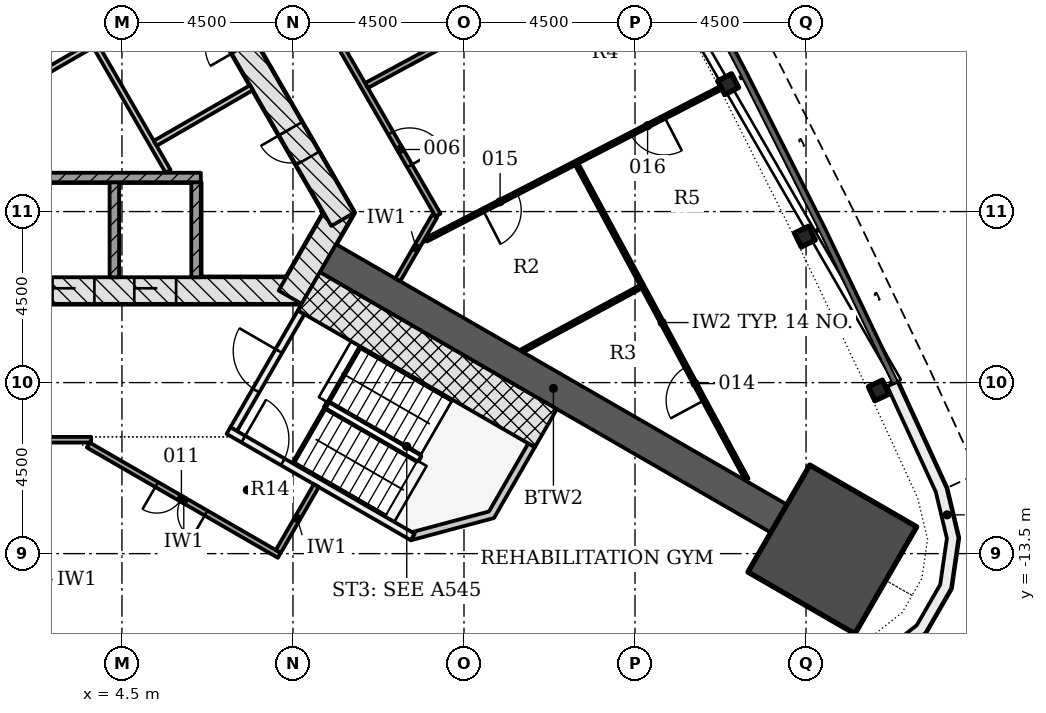
"""IFC4 building model, lengths in metres.
Left out: names, types, materials, properties, quantities, classifications, styles, units other than length and angle.
Written with IfcOpenShell. Run it as: python <this file> out.ifc"""

import sys

from ifc_helpers import new_model, si_unit, direction, frame, frame_2d, origin, origin_2d, place, context, subcontext, project, spatial, polyline, rectangle, i_section, outline, extrude, element, fill, save


model = new_model("IFC4")
c1 = context("Model", 3, precision=1e-05, world=origin(), true_north=direction((0.0, 1.0)))
c2 = subcontext(c1, "Body", "Model", "MODEL_VIEW")
j1 = project(units=[si_unit("LENGTHUNIT", "METRE"), si_unit("PLANEANGLEUNIT", "RADIAN")], contexts=[c1])
p1 = place(None, origin())
s1 = spatial("IfcSite", under=j1, at=p1, CompositionType="ELEMENT")
p2 = place(p1, origin())
s2 = spatial("IfcBuilding", under=s1, at=p2, CompositionType="ELEMENT")
p3 = place(p2, frame((0.0, 0.0, 58.2)))
s3 = spatial("IfcBuildingStorey", under=s2, at=p3, CompositionType="ELEMENT", Elevation=58.2)
p4 = place(p3, frame((-9.229, -6.578, -0.2), z_axis=(0.0, 0.0, 1.0), x_axis=(1.0, 0.0, 0.0)))
e1 = element("IfcWall", 1, at=p4, inside=s3, PredefinedType="SHEAR", context=c2, shape_type="SweptSolid", body=[
    extrude(rectangle(XDim=18.458, YDim=0.7, at=frame_2d((9.229, 0.0))), origin(), (0.0, 0.0, 1.0), 3.6),
])
p5 = place(p4, frame((3.304, 0.0, 0.2)))
e2 = element("IfcOpeningElement", 2, at=p5, cuts=e1, PredefinedType="OPENING", context=c2, shape_type="SweptSolid", body=[
    extrude(rectangle(XDim=1.1, YDim=2.1, at=frame_2d((0.55, 1.05))), frame((0.0, 0.36, 0.0), z_axis=(0.0, -1.0, 0.0), x_axis=(1.0, 0.0, 0.0)), (0.0, 0.0, 1.0), 0.72),
])
p6 = place(p4, frame((5.454, 0.0, 0.2)))
e3 = element("IfcOpeningElement", 3, at=p6, cuts=e1, PredefinedType="OPENING", context=c2, shape_type="SweptSolid", body=[
    extrude(rectangle(XDim=1.1, YDim=2.1, at=frame_2d((0.55, 1.05))), frame((0.0, 0.36, 0.0), z_axis=(0.0, -1.0, 0.0), x_axis=(1.0, 0.0, 0.0)), (0.0, 0.0, 1.0), 0.72),
])
p7 = place(p4, frame((7.604, 0.0, 0.2)))
e4 = element("IfcOpeningElement", 4, at=p7, cuts=e1, PredefinedType="OPENING", context=c2, shape_type="SweptSolid", body=[
    extrude(rectangle(XDim=1.1, YDim=2.1, at=frame_2d((0.55, 1.05))), frame((0.0, 0.36, 0.0), z_axis=(0.0, -1.0, 0.0), x_axis=(1.0, 0.0, 0.0)), (0.0, 0.0, 1.0), 0.72),
])
p8 = place(p4, frame((9.754, 0.0, 0.2)))
e5 = element("IfcOpeningElement", 5, at=p8, cuts=e1, PredefinedType="OPENING", context=c2, shape_type="SweptSolid", body=[
    extrude(rectangle(XDim=1.1, YDim=2.1, at=frame_2d((0.55, 1.05))), frame((0.0, 0.36, 0.0), z_axis=(0.0, -1.0, 0.0), x_axis=(1.0, 0.0, 0.0)), (0.0, 0.0, 1.0), 0.72),
])
p9 = place(p4, frame((11.904, 0.0, 0.2)))
e6 = element("IfcOpeningElement", 6, at=p9, cuts=e1, PredefinedType="OPENING", context=c2, shape_type="SweptSolid", body=[
    extrude(rectangle(XDim=1.1, YDim=2.1, at=frame_2d((0.55, 1.05))), frame((0.0, 0.36, 0.0), z_axis=(0.0, -1.0, 0.0), x_axis=(1.0, 0.0, 0.0)), (0.0, 0.0, 1.0), 0.72),
])
p10 = place(p4, frame((14.054, 0.0, 0.2)))
e7 = element("IfcOpeningElement", 7, at=p10, cuts=e1, PredefinedType="OPENING", context=c2, shape_type="SweptSolid", body=[
    extrude(rectangle(XDim=1.1, YDim=2.1, at=frame_2d((0.55, 1.05))), frame((0.0, 0.36, 0.0), z_axis=(0.0, -1.0, 0.0), x_axis=(1.0, 0.0, 0.0)), (0.0, 0.0, 1.0), 0.72),
])
p11 = place(p4, frame((0.926, 0.0, 0.2)))
e8 = element("IfcOpeningElement", 8, at=p11, cuts=e1, PredefinedType="OPENING", context=c2, shape_type="SweptSolid", body=[
    extrude(rectangle(XDim=0.9, YDim=2.1, at=frame_2d((0.45, 1.05))), frame((0.0, 0.36, 0.0), z_axis=(0.0, -1.0, 0.0), x_axis=(1.0, 0.0, 0.0)), (0.0, 0.0, 1.0), 0.72),
])
p12 = place(p3, frame((8.926, -6.753, -0.2), z_axis=(0.0, 0.0, 1.0), x_axis=(0.500042739161, 0.866000726912, 0.0)))
e9 = element("IfcWall", 9, at=p12, inside=s3, PredefinedType="SHEAR", context=c2, shape_type="SweptSolid", body=[
    extrude(rectangle(XDim=2.771, YDim=0.7, at=frame_2d((1.386, 0.0))), origin(), (0.0, 0.0, 1.0), 3.6),
])
p13 = place(p3, frame((10.311, -4.703, -0.2), z_axis=(0.0, 0.0, 1.0), x_axis=(-0.500001446645, 0.866024568562, 0.0)))
e10 = element("IfcWall", 10, at=p13, inside=s3, PredefinedType="SHEAR", context=c2, shape_type="SweptSolid", body=[
    extrude(rectangle(XDim=18.458, YDim=0.7, at=frame_2d((9.229, 0.0))), origin(), (0.0, 0.0, 1.0), 3.6),
])
p14 = place(p13, frame((7.5, 0.0, 0.2)))
e11 = element("IfcOpeningElement", 11, at=p14, cuts=e10, PredefinedType="OPENING", context=c2, shape_type="SweptSolid", body=[
    extrude(rectangle(XDim=1.0, YDim=2.1, at=frame_2d((0.5, 1.05))), frame((0.0, 0.36, 0.0), z_axis=(0.0, -1.0, 0.0), x_axis=(1.0, 0.0, 0.0)), (0.0, 0.0, 1.0), 0.72),
])
p15 = place(p13, frame((1.852, 0.0, 0.2)))
e12 = element("IfcOpeningElement", 12, at=p15, cuts=e10, PredefinedType="OPENING", context=c2, shape_type="SweptSolid", body=[
    extrude(rectangle(XDim=0.9, YDim=2.1, at=frame_2d((0.45, 1.05))), frame((0.0, 0.36, 0.0), z_axis=(0.0, -1.0, 0.0), x_axis=(1.0, 0.0, 0.0)), (0.0, 0.0, 1.0), 0.72),
])
p16 = place(p13, frame((5.238, 0.0, 0.2)))
e13 = element("IfcOpeningElement", 13, at=p16, cuts=e10, PredefinedType="OPENING", context=c2, shape_type="SweptSolid", body=[
    extrude(rectangle(XDim=1.0, YDim=2.1, at=frame_2d((0.5, 1.05))), frame((0.0, 0.36, 0.0), z_axis=(0.0, -1.0, 0.0), x_axis=(1.0, 0.0, 0.0)), (0.0, 0.0, 1.0), 0.72),
])
p17 = place(p13, frame((13.63, 0.0, 0.2)))
e14 = element("IfcOpeningElement", 14, at=p17, cuts=e10, PredefinedType="OPENING", context=c2, shape_type="SweptSolid", body=[
    extrude(rectangle(XDim=0.9, YDim=2.1, at=frame_2d((0.45, 1.05))), frame((0.0, 0.36, 0.0), z_axis=(0.0, -1.0, 0.0), x_axis=(1.0, 0.0, 0.0)), (0.0, 0.0, 1.0), 0.72),
])
p18 = place(p3, frame((9.922, -5.728, -0.2), z_axis=(0.0, 0.0, 1.0), x_axis=(0.866030067197, -0.499991922645, 0.0)))
e15 = element("IfcWall", 15, at=p18, inside=s3, PredefinedType="SHEAR", context=c2, shape_type="SweptSolid", body=[
    extrude(rectangle(XDim=13.698, YDim=0.85, at=frame_2d((6.849, 0.0))), origin(), (0.0, 0.0, 1.0), 3.6),
])
p19 = place(p3, frame((23.192, -13.39, -0.2), z_axis=(0.0, 0.0, 1.0), x_axis=(0.866025403784, -0.5, 0.0)))
e16 = element("IfcColumn", 16, at=p19, inside=s3, PredefinedType="COLUMN", context=c2, shape_type="SweptSolid", body=[
    extrude(rectangle(XDim=3.25, YDim=3.25, at=origin_2d()), origin(), (0.0, 0.0, 1.0), 3.6),
])
for number, where, z_axis, x_axis in (
    (17, (24.411, -9.206, -0.2), (0.0, 0.0, 1.0), (-0.424, 0.906, 0.0)),
    (18, (22.469, -5.158, -0.2), (0.0, 0.0, 1.0), (-0.441, 0.897, 0.0)),
    (19, (20.451, -1.148, -0.2), (0.0, 0.0, 1.0), (-0.458, 0.889, 0.0)),
):
    element("IfcColumn", number, at=place(p3, frame(where, z_axis=z_axis, x_axis=x_axis)), inside=s3, PredefinedType="COLUMN", context=c2, shape_type="SweptSolid", body=[
        extrude(i_section(OverallWidth=0.404, OverallDepth=0.406, WebThickness=0.027, FlangeThickness=0.044, FilletRadius=0.015, at=origin_2d()), origin(), (0.0, 0.0, 1.0), 3.6),
    ])
p20 = place(p3, origin())
e20 = element("IfcWall", 20, at=p20, inside=s3, PredefinedType="NOTDEFINED", context=c2, shape_type="SweptSolid", body=[
    extrude(outline(polyline([(20.225, -17.085), (23.297, -16.8), (24.588, -16.417), (25.645, -15.583), (26.318, -14.417), (26.511, -13.085), (26.198, -11.776), (24.909, -8.973), (24.636, -9.098), (25.913, -11.875), (26.206, -13.099), (26.029, -14.317), (25.414, -15.384), (24.447, -16.146), (23.24, -16.504), (20.197, -16.787), (20.225, -17.085)])), origin(), (0.0, 0.0, 1.0), 3.3),
])
for number, where, z_axis, x_axis in (
    (21, (4.3, -6.228, -0.2), (0.0, 0.0, 1.0), (0.0, 1.0, 0.0)),
    (22, (6.45, -6.228, -0.2), (0.0, 0.0, 1.0), (0.0, 1.0, 0.0)),
):
    element("IfcWall", number, at=place(p3, frame(where, z_axis=z_axis, x_axis=x_axis)), inside=s3, PredefinedType="PARTITIONING", context=c2, shape_type="SweptSolid", body=[
        extrude(rectangle(XDim=2.5, YDim=0.25, at=frame_2d((1.25, 0.0))), origin(), (0.0, 0.0, 1.0), 3.6),
    ])
p21 = place(p3, frame((-6.575, -3.603, 0.0), z_axis=(0.0, 0.0, 1.0), x_axis=(1.0, 0.0, 0.0)))
e23 = element("IfcWall", 23, at=p21, inside=s3, PredefinedType="PARTITIONING", context=c2, shape_type="SweptSolid", body=[
    extrude(rectangle(XDim=13.15, YDim=0.25, at=frame_2d((6.575, 0.0))), origin(), (0.0, 0.0, 1.0), 3.4),
])
p22 = place(p3, frame((-4.904, -3.413, 0.0), z_axis=(0.0, 0.0, 1.0), x_axis=(0.866020716117, 0.500008119189, 0.0)))
e24 = element("IfcWall", 24, at=p22, inside=s3, PredefinedType="PARTITIONING", context=c2, shape_type="SweptSolid", body=[
    extrude(rectangle(XDim=12.182, YDim=0.15, at=frame_2d((6.091, 0.0))), origin(), (0.0, 0.0, 1.0), 3.4),
])
p23 = place(p22, frame((4.142, 0.0, 0.0)))
e25 = element("IfcOpeningElement", 25, at=p23, cuts=e24, PredefinedType="OPENING", context=c2, shape_type="SweptSolid", body=[
    extrude(rectangle(XDim=0.9, YDim=2.1, at=frame_2d((0.45, 1.05))), frame((0.0, 0.085, 0.0), z_axis=(0.0, -1.0, 0.0), x_axis=(1.0, 0.0, 0.0)), (0.0, 0.0, 1.0), 0.17),
])
p24 = place(p3, frame((-2.004, -3.413, 0.0), z_axis=(0.0, 0.0, 1.0), x_axis=(0.866030034802, 0.499991978756, 0.0)))
e26 = element("IfcWall", 26, at=p24, inside=s3, PredefinedType="PARTITIONING", context=c2, shape_type="SweptSolid", body=[
    extrude(rectangle(XDim=9.671, YDim=0.15, at=frame_2d((4.835, 0.0))), origin(), (0.0, 0.0, 1.0), 3.4),
])
p25 = place(p24, frame((2.886, 0.0, 0.0)))
e27 = element("IfcOpeningElement", 27, at=p25, cuts=e26, PredefinedType="OPENING", context=c2, shape_type="SweptSolid", body=[
    extrude(rectangle(XDim=0.9, YDim=2.1, at=frame_2d((0.45, 1.05))), frame((0.0, 0.085, 0.0), z_axis=(0.0, -1.0, 0.0), x_axis=(1.0, 0.0, 0.0)), (0.0, 0.0, 1.0), 0.17),
])
p26 = place(p3, frame((5.713, -3.439, 0.0), z_axis=(0.0, 0.0, 1.0), x_axis=(-0.499981559197, 0.866036050325, 0.0)))
e28 = element("IfcWall", 28, at=p26, inside=s3, PredefinedType="PARTITIONING", context=c2, shape_type="SweptSolid", body=[
    extrude(rectangle(XDim=3.806, YDim=0.15, at=frame_2d((1.903, 0.0))), origin(), (0.0, 0.0, 1.0), 3.4),
])
p27 = place(p3, frame((5.375, -2.703, 0.0), z_axis=(0.0, 0.0, 1.0), x_axis=(0.866046596414, 0.499963291492, 0.0)))
e29 = element("IfcWall", 29, at=p27, inside=s3, PredefinedType="PARTITIONING", context=c2, shape_type="SweptSolid", body=[
    extrude(rectangle(XDim=2.925, YDim=0.15, at=frame_2d((1.462, 0.0))), origin(), (0.0, 0.0, 1.0), 3.4),
])
p28 = place(p3, frame((7.44, -10.226, -0.2), z_axis=(0.0, 0.0, 1.0), x_axis=(0.500022077904, 0.866012656725, 0.0)))
e30 = element("IfcWall", 30, at=p28, inside=s3, PredefinedType="SHEAR", context=c2, shape_type="SweptSolid", body=[
    extrude(rectangle(XDim=3.55, YDim=0.2, at=frame_2d((1.775, 0.0))), origin(), (0.0, 0.0, 1.0), 3.6),
])
p29 = place(p28, frame((1.175, 0.0, 0.2)))
e31 = element("IfcOpeningElement", 31, at=p29, cuts=e30, PredefinedType="OPENING", context=c2, shape_type="SweptSolid", body=[
    extrude(rectangle(XDim=1.2, YDim=2.1, at=frame_2d((0.6, 1.05))), frame((0.0, 0.11, 0.0), z_axis=(0.0, -1.0, 0.0), x_axis=(1.0, 0.0, 0.0)), (0.0, 0.0, 1.0), 0.22),
])
p30 = place(p3, frame((7.304, -10.262, -0.2), z_axis=(0.0, 0.0, 1.0), x_axis=(0.866026594901, -0.49999793692, 0.0)))
e32 = element("IfcWall", 32, at=p30, inside=s3, PredefinedType="SHEAR", context=c2, shape_type="SweptSolid", body=[
    extrude(rectangle(XDim=5.6, YDim=0.2, at=frame_2d((2.8, 0.0))), origin(), (0.0, 0.0, 1.0), 3.6),
])
p31 = place(p30, frame((0.45, 0.0, 0.2)))
e33 = element("IfcOpeningElement", 33, at=p31, cuts=e32, PredefinedType="OPENING", context=c2, shape_type="SweptSolid", body=[
    extrude(rectangle(XDim=1.2, YDim=2.1, at=frame_2d((0.6, 1.05))), frame((0.0, 0.11, 0.0), z_axis=(0.0, -1.0, 0.0), x_axis=(1.0, 0.0, 0.0)), (0.0, 0.0, 1.0), 0.22),
])
p32 = place(p3, frame((9.419, -6.599, -0.2), z_axis=(0.0, 0.0, 1.0), x_axis=(0.866033125095, -0.499986626058, 0.0)))
e34 = element("IfcWall", 34, at=p32, inside=s3, PredefinedType="SHEAR", context=c2, shape_type="SweptSolid", body=[
    extrude(rectangle(XDim=7.2, YDim=1.161, at=frame_2d((3.6, 0.0))), origin(), (0.0, 0.0, 1.0), 3.6),
])
p33 = place(p3, frame((0.0, 0.0, -0.2)))
e35 = element("IfcWall", 35, at=p33, inside=s3, PredefinedType="SHEAR", context=c2, shape_type="SweptSolid", body=[
    extrude(outline(polyline([(12.104, -13.149), (14.289, -12.563), (15.364, -10.701), (15.191, -10.601), (14.157, -12.392), (12.132, -12.934), (12.204, -12.976), (12.204, -12.976), (12.204, -12.976), (12.204, -12.976), (12.204, -12.976), (12.204, -12.976), (12.204, -12.976), (12.204, -12.976), (12.204, -12.976), (12.204, -12.976), (12.204, -12.976), (12.204, -12.976), (12.204, -12.976), (12.204, -12.976), (12.204, -12.976), (12.204, -12.976), (12.204, -12.976), (12.104, -13.149)])), origin(), (0.0, 0.0, 1.0), 3.6),
])
p34 = place(p3, frame((5.289, 8.446, 0.0), z_axis=(0.0, 0.0, 1.0), x_axis=(0.499996620721, -0.866027354803, 0.0)))
e36 = element("IfcWall", 36, at=p34, inside=s3, PredefinedType="PARTITIONING", context=c2, shape_type="SweptSolid", body=[
    extrude(rectangle(XDim=15.057, YDim=0.15, at=frame_2d((7.528, 0.0))), origin(), (0.0, 0.0, 1.0), 2.778),
])
p35 = place(p34, frame((12.563, 0.0, 0.0)))
e37 = element("IfcOpeningElement", 37, at=p35, cuts=e36, PredefinedType="OPENING", context=c2, shape_type="SweptSolid", body=[
    extrude(rectangle(XDim=1.0, YDim=2.1, at=frame_2d((0.5, 1.05))), frame((0.0, 0.085, 0.0), z_axis=(0.0, -1.0, 0.0), x_axis=(1.0, 0.0, 0.0)), (0.0, 0.0, 1.0), 0.17),
])
p36 = place(p34, frame((7.312, 0.0, 0.0)))
e38 = element("IfcOpeningElement", 38, at=p36, cuts=e36, PredefinedType="OPENING", context=c2, shape_type="SweptSolid", body=[
    extrude(rectangle(XDim=1.0, YDim=2.1, at=frame_2d((0.5, 1.05))), frame((0.0, 0.085, 0.0), z_axis=(0.0, -1.0, 0.0), x_axis=(1.0, 0.0, 0.0)), (0.0, 0.0, 1.0), 0.17),
])
p37 = place(p34, frame((5.356, 0.0, 0.0)))
e39 = element("IfcOpeningElement", 39, at=p37, cuts=e36, PredefinedType="OPENING", context=c2, shape_type="SweptSolid", body=[
    extrude(rectangle(XDim=1.0, YDim=2.1, at=frame_2d((0.5, 1.05))), frame((0.0, 0.085, 0.0), z_axis=(0.0, -1.0, 0.0), x_axis=(1.0, 0.0, 0.0)), (0.0, 0.0, 1.0), 0.17),
])
p38 = place(p3, frame((3.689, -10.503, 0.0), z_axis=(0.0, 0.0, 1.0), x_axis=(-1.0, 0.0, 0.0)))
e40 = element("IfcWall", 40, at=p38, inside=s3, PredefinedType="PARTITIONING", context=c2, shape_type="SweptSolid", body=[
    extrude(rectangle(XDim=13.068, YDim=0.15, at=frame_2d((6.534, 0.0))), origin(), (0.0, 0.0, 1.0), 2.778),
])
p39 = place(p38, frame((10.852, 0.0, 0.0)))
e41 = element("IfcOpeningElement", 41, at=p39, cuts=e40, PredefinedType="OPENING", context=c2, shape_type="SweptSolid", body=[
    extrude(rectangle(XDim=1.5, YDim=2.1, at=frame_2d((0.75, 1.05))), frame((0.0, 0.085, 0.0), z_axis=(0.0, -1.0, 0.0), x_axis=(1.0, 0.0, 0.0)), (0.0, 0.0, 1.0), 0.17),
])
p40 = place(p38, frame((5.119, 0.0, 0.0)))
e42 = element("IfcOpeningElement", 42, at=p40, cuts=e40, PredefinedType="OPENING", context=c2, shape_type="SweptSolid", body=[
    extrude(rectangle(XDim=1.5, YDim=2.1, at=frame_2d((0.75, 1.05))), frame((0.0, 0.085, 0.0), z_axis=(0.0, -1.0, 0.0), x_axis=(1.0, 0.0, 0.0)), (0.0, 0.0, 1.0), 0.17),
])
p41 = place(p3, frame((8.641, -13.546, 0.0), z_axis=(0.0, 0.0, 1.0), x_axis=(-0.866042728627, 0.499969991291, 0.0)))
e43 = element("IfcWall", 43, at=p41, inside=s3, PredefinedType="PARTITIONING", context=c2, shape_type="SweptSolid", body=[
    extrude(rectangle(XDim=5.805, YDim=0.15, at=frame_2d((2.903, 0.0))), origin(), (0.0, 0.0, 1.0), 2.778),
])
p42 = place(p41, frame((2.225, 0.0, 0.0)))
e44 = element("IfcOpeningElement", 44, at=p42, cuts=e43, PredefinedType="OPENING", context=c2, shape_type="SweptSolid", body=[
    extrude(rectangle(XDim=1.5, YDim=2.1, at=frame_2d((0.75, 1.05))), frame((0.0, 0.085, 0.0), z_axis=(0.0, -1.0, 0.0), x_axis=(1.0, 0.0, 0.0)), (0.0, 0.0, 1.0), 0.17),
])
p43 = place(p3, frame((8.614, -13.444, 0.0), z_axis=(0.0, 0.0, 1.0), x_axis=(0.499972520799, 0.866041268327, 0.0)))
e45 = element("IfcWall", 45, at=p43, inside=s3, PredefinedType="PARTITIONING", context=c2, shape_type="SweptSolid", body=[
    extrude(rectangle(XDim=2.0, YDim=0.15, at=frame_2d((1.0, 0.0))), origin(), (0.0, 0.0, 1.0), 3.4),
])
p44 = place(p3, frame((11.758, -6.298, 0.0), z_axis=(0.0, 0.0, 1.0), x_axis=(0.500049131089, 0.865997036079, 0.0)))
e46 = element("IfcWall", 46, at=p44, inside=s3, PredefinedType="PARTITIONING", context=c2, shape_type="SweptSolid", body=[
    extrude(rectangle(XDim=1.941, YDim=0.15, at=frame_2d((0.97, 0.0))), origin(), (0.0, 0.0, 1.0), 2.778),
])
p45 = place(p3, frame((18.136, 2.704, 0.0), z_axis=(0.0, 0.0, 1.0), x_axis=(-0.879993465077, -0.474985790757, 0.0)))
e47 = element("IfcWall", 47, at=p45, inside=s3, PredefinedType="PARTITIONING", context=c2, shape_type="SweptSolid", body=[
    extrude(rectangle(XDim=8.181, YDim=0.15, at=frame_2d((4.091, 0.0))), origin(), (0.0, 0.0, 1.0), 2.778),
])
p46 = place(p3, frame((20.944, -11.552, 0.0), z_axis=(0.0, 0.0, 1.0), x_axis=(-0.475001956127, 0.879984739456, 0.0)))
e48 = element("IfcWall", 48, at=p46, inside=s3, PredefinedType="PARTITIONING", context=c2, shape_type="SweptSolid", body=[
    extrude(rectangle(XDim=9.39, YDim=0.1, at=frame_2d((4.695, 0.0))), origin(), (0.0, 0.0, 1.0), 2.778),
])
p47 = place(p46, frame((2.37, 0.0, 0.0)))
e49 = element("IfcOpeningElement", 49, at=p47, cuts=e48, PredefinedType="OPENING", context=c2, shape_type="SweptSolid", body=[
    extrude(rectangle(XDim=1.0, YDim=2.1, at=frame_2d((0.5, 1.05))), frame((0.0, 0.06, 0.0), z_axis=(0.0, -1.0, 0.0), x_axis=(1.0, 0.0, 0.0)), (0.0, 0.0, 1.0), 0.12),
])
p48 = place(p3, frame((20.229, -1.262, 0.0), z_axis=(0.0, 0.0, 1.0), x_axis=(-0.888895553513, -0.458109915789, 0.0)))
e50 = element("IfcWall", 50, at=p48, inside=s3, PredefinedType="PARTITIONING", context=c2, shape_type="SweptSolid", body=[
    extrude(rectangle(XDim=8.694, YDim=0.1, at=frame_2d((4.347, 0.0))), origin(), (0.0, 0.0, 1.0), 2.778),
])
p49 = place(p48, frame((6.001, 0.0, 0.0)))
e51 = element("IfcOpeningElement", 51, at=p49, cuts=e50, PredefinedType="OPENING", context=c2, shape_type="SweptSolid", body=[
    extrude(rectangle(XDim=1.0, YDim=2.1, at=frame_2d((0.5, 1.05))), frame((0.0, 0.06, 0.0), z_axis=(0.0, -1.0, 0.0), x_axis=(1.0, 0.0, 0.0)), (0.0, 0.0, 1.0), 0.12),
])
p50 = place(p48, frame((1.635, 0.0, 0.0)))
e52 = element("IfcOpeningElement", 52, at=p50, cuts=e50, PredefinedType="OPENING", context=c2, shape_type="SweptSolid", body=[
    extrude(rectangle(XDim=1.0, YDim=2.1, at=frame_2d((0.5, 1.05))), frame((0.0, 0.06, 0.0), z_axis=(0.0, -1.0, 0.0), x_axis=(1.0, 0.0, 0.0)), (0.0, 0.0, 1.0), 0.12),
])
p51 = place(p3, frame((18.15, -6.481, 0.0), z_axis=(0.0, 0.0, 1.0), x_axis=(-0.879976377599, -0.475017446909, 0.0)))
e53 = element("IfcWall", 53, at=p51, inside=s3, PredefinedType="PARTITIONING", context=c2, shape_type="SweptSolid", body=[
    extrude(rectangle(XDim=3.537, YDim=0.1, at=frame_2d((1.769, 0.0))), origin(), (0.0, 0.0, 1.0), 3.4),
])
p52 = place(p9, origin())
e54 = element("IfcDoor", 54, at=p52, inside=s3, OperationType="DOUBLE_DOOR_SLIDING", PredefinedType="DOOR", context=c2, shape_type="SweptSolid", body=[
    extrude(rectangle(XDim=1.1, YDim=2.1, at=frame_2d((0.55, 1.05))), frame((0.0, 0.025, 0.0), z_axis=(0.0, -1.0, 0.0), x_axis=(1.0, 0.0, 0.0)), (0.0, 0.0, 1.0), 0.05),
])
fill(e6, e54)
p53 = place(p10, origin())
e55 = element("IfcDoor", 55, at=p53, inside=s3, OperationType="DOUBLE_DOOR_SLIDING", PredefinedType="DOOR", context=c2, shape_type="SweptSolid", body=[
    extrude(rectangle(XDim=1.1, YDim=2.1, at=frame_2d((0.55, 1.05))), frame((0.0, 0.025, 0.0), z_axis=(0.0, -1.0, 0.0), x_axis=(1.0, 0.0, 0.0)), (0.0, 0.0, 1.0), 0.05),
])
fill(e7, e55)
p54 = place(p15, origin())
e56 = element("IfcDoor", 56, at=p54, inside=s3, OperationType="SINGLE_SWING_RIGHT", PredefinedType="DOOR", context=c2, shape_type="SweptSolid", body=[
    extrude(rectangle(XDim=0.9, YDim=2.1, at=frame_2d((0.45, 1.05))), frame((0.0, 0.075, 0.0), z_axis=(0.0, -1.0, 0.0), x_axis=(1.0, 0.0, 0.0)), (0.0, 0.0, 1.0), 0.15),
])
fill(e12, e56)
p55 = place(p29, origin())
e57 = element("IfcDoor", 57, at=p55, inside=s3, OperationType="SINGLE_SWING_RIGHT", PredefinedType="DOOR", context=c2, shape_type="SweptSolid", body=[
    extrude(rectangle(XDim=1.2, YDim=2.1, at=frame_2d((0.6, 1.05))), frame((0.0, 0.025, 0.0), z_axis=(0.0, -1.0, 0.0), x_axis=(1.0, 0.0, 0.0)), (0.0, 0.0, 1.0), 0.05),
])
fill(e31, e57)
p56 = place(p31, origin())
e58 = element("IfcDoor", 58, at=p56, inside=s3, OperationType="SINGLE_SWING_LEFT", PredefinedType="DOOR", context=c2, shape_type="SweptSolid", body=[
    extrude(rectangle(XDim=1.2, YDim=2.1, at=frame_2d((0.6, 1.05))), frame((0.0, 0.025, 0.0), z_axis=(0.0, -1.0, 0.0), x_axis=(1.0, 0.0, 0.0)), (0.0, 0.0, 1.0), 0.05),
])
fill(e33, e58)
p57 = place(p35, origin())
e59 = element("IfcDoor", 59, at=p57, inside=s3, OperationType="SINGLE_SWING_RIGHT", PredefinedType="DOOR", context=c2, shape_type="SweptSolid", body=[
    extrude(rectangle(XDim=1.0, YDim=2.1, at=frame_2d((0.5, 1.05))), frame((0.0, 0.025, 0.0), z_axis=(0.0, -1.0, 0.0), x_axis=(1.0, 0.0, 0.0)), (0.0, 0.0, 1.0), 0.05),
])
fill(e37, e59)
p58 = place(p42, origin())
e60 = element("IfcDoor", 60, at=p58, inside=s3, OperationType="DOUBLE_DOOR_SINGLE_SWING", PredefinedType="DOOR", context=c2, shape_type="SweptSolid", body=[
    extrude(rectangle(XDim=1.5, YDim=2.1, at=frame_2d((0.75, 1.05))), frame((0.0, 0.025, 0.0), z_axis=(0.0, -1.0, 0.0), x_axis=(1.0, 0.0, 0.0)), (0.0, 0.0, 1.0), 0.05),
])
fill(e44, e60)
p59 = place(p47, origin())
e61 = element("IfcDoor", 61, at=p59, inside=s3, OperationType="SINGLE_SWING_LEFT", PredefinedType="DOOR", context=c2, shape_type="SweptSolid", body=[
    extrude(rectangle(XDim=1.0, YDim=2.1, at=frame_2d((0.5, 1.05))), frame((0.0, 0.025, 0.0), z_axis=(0.0, -1.0, 0.0), x_axis=(1.0, 0.0, 0.0)), (0.0, 0.0, 1.0), 0.05),
])
fill(e49, e61)
p60 = place(p49, origin())
e62 = element("IfcDoor", 62, at=p60, inside=s3, OperationType="SINGLE_SWING_RIGHT", PredefinedType="DOOR", context=c2, shape_type="SweptSolid", body=[
    extrude(rectangle(XDim=1.0, YDim=2.1, at=frame_2d((0.5, 1.05))), frame((0.0, 0.025, 0.0), z_axis=(0.0, -1.0, 0.0), x_axis=(1.0, 0.0, 0.0)), (0.0, 0.0, 1.0), 0.05),
])
fill(e51, e62)
p61 = place(p50, origin())
e63 = element("IfcDoor", 63, at=p61, inside=s3, OperationType="SINGLE_SWING_LEFT", PredefinedType="DOOR", context=c2, shape_type="SweptSolid", body=[
    extrude(rectangle(XDim=1.0, YDim=2.1, at=frame_2d((0.5, 1.05))), frame((0.0, 0.025, 0.0), z_axis=(0.0, -1.0, 0.0), x_axis=(1.0, 0.0, 0.0)), (0.0, 0.0, 1.0), 0.05),
])
fill(e52, e63)
save(model, sys.argv[1])
